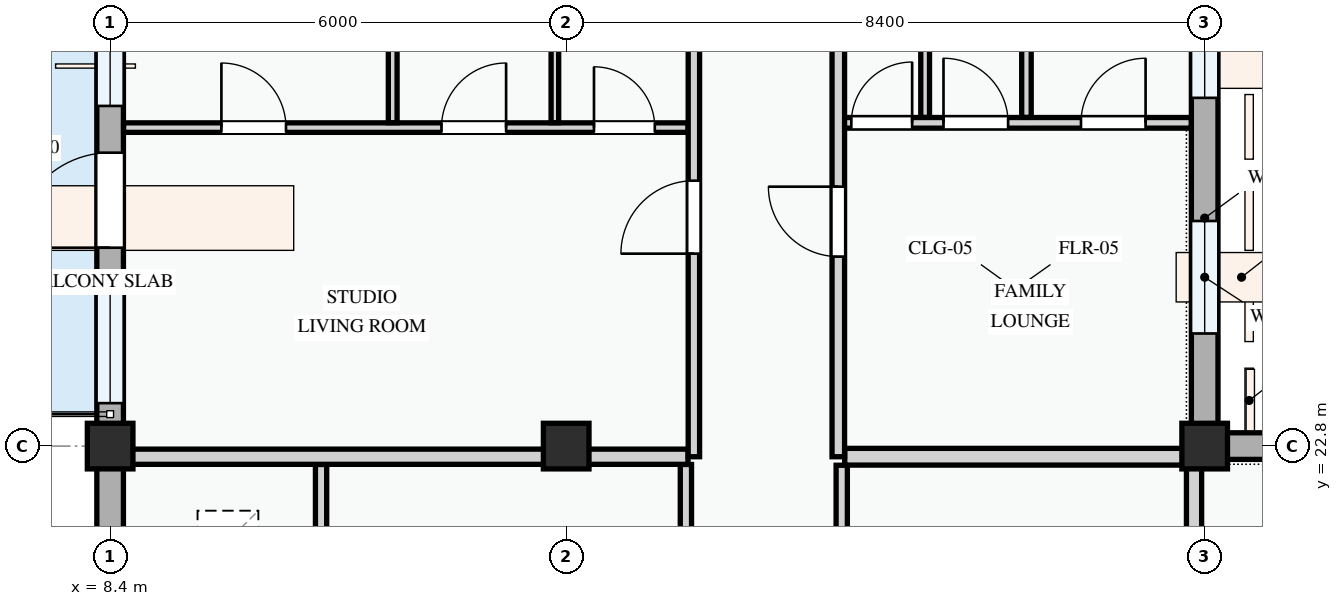
"""IFC4 building model, lengths in metres.
Left out: names, types, materials, properties, quantities, classifications, styles, units other than length and angle.
Written with IfcOpenShell. Run it as: python <this file> out.ifc"""

import sys

from ifc_helpers import new_model, si_unit, direction, frame, frame_2d, origin, origin_2d, place, context, subcontext, project, spatial, rectangle, extrude, element, fill, save


model = new_model("IFC4")
c1 = context("Model", 3, precision=1e-05, world=origin(), true_north=direction((0.0, 1.0)))
c2 = subcontext(c1, "Body", "Model", "MODEL_VIEW")
j1 = project(units=[si_unit("LENGTHUNIT", "METRE"), si_unit("PLANEANGLEUNIT", "RADIAN")], contexts=[c1])
p1 = place(None, origin())
s1 = spatial("IfcSite", under=j1, at=p1, CompositionType="ELEMENT")
p2 = place(p1, origin())
s2 = spatial("IfcBuilding", under=s1, at=p2, CompositionType="ELEMENT")
p3 = place(p2, frame((0.0, 0.0, 8.1)))
s3 = spatial("IfcBuildingStorey", under=s2, at=p3, CompositionType="ELEMENT", Elevation=8.1)
for number, where, z_axis, x_axis in (
    (1, (8.4, 22.8, 0.0), (0.0, 0.0, 1.0), (1.0, 0.0, 0.0)),
    (2, (14.4, 22.8, 0.0), (0.0, 0.0, 1.0), (1.0, 0.0, 0.0)),
    (3, (22.8, 22.8, 0.0), (0.0, 0.0, 1.0), (1.0, 0.0, 0.0)),
):
    element("IfcColumn", number, at=place(p3, frame(where, z_axis=z_axis, x_axis=x_axis)), inside=s3, PredefinedType="COLUMN", context=c2, shape_type="SweptSolid", body=[
        extrude(rectangle(XDim=0.6, YDim=0.6, at=origin_2d()), origin(), (0.0, 0.0, 1.0), 3.3),
    ])
p4 = place(p3, frame((22.8, 22.8, 0.0), z_axis=(0.0, 0.0, 1.0), x_axis=(0.0, 1.0, 0.0)))
e4 = element("IfcWall", 4, at=p4, inside=s3, PredefinedType="STANDARD", context=c2, shape_type="SweptSolid", body=[
    extrude(rectangle(XDim=6.0, YDim=0.35, at=frame_2d((3.0, 0.0))), origin(), (0.0, 0.0, 1.0), 2.575),
])
p5 = place(p4, frame((1.481, 0.0, 0.78)))
e5 = element("IfcOpeningElement", 5, at=p5, cuts=e4, PredefinedType="OPENING", context=c2, shape_type="SweptSolid", body=[
    extrude(rectangle(XDim=1.48, YDim=1.52, at=frame_2d((0.74, 0.76))), frame((0.0, 0.185, 0.0), z_axis=(0.0, -1.0, 0.0), x_axis=(1.0, 0.0, 0.0)), (0.0, 0.0, 1.0), 0.37),
])
p6 = place(p4, frame((4.581, 0.0, 0.78)))
e6 = element("IfcOpeningElement", 6, at=p6, cuts=e4, PredefinedType="OPENING", context=c2, shape_type="SweptSolid", body=[
    extrude(rectangle(XDim=0.9, YDim=1.2, at=frame_2d((0.45, 0.6))), frame((0.0, 0.185, 0.0), z_axis=(0.0, -1.0, 0.0), x_axis=(1.0, 0.0, 0.0)), (0.0, 0.0, 1.0), 0.37),
])
p7 = place(p3, frame((8.4, 28.8, 0.0), z_axis=(0.0, 0.0, 1.0), x_axis=(0.0, -1.0, 0.0)))
e7 = element("IfcWall", 7, at=p7, inside=s3, PredefinedType="STANDARD", context=c2, shape_type="SweptSolid", body=[
    extrude(rectangle(XDim=6.0, YDim=0.35, at=frame_2d((3.0, 0.0))), origin(), (0.0, 0.0, 1.0), 2.445),
])
p8 = place(p7, frame((2.14, 0.0, 0.0)))
e8 = element("IfcOpeningElement", 8, at=p8, cuts=e7, PredefinedType="OPENING", context=c2, shape_type="SweptSolid", body=[
    extrude(rectangle(XDim=1.25, YDim=2.2, at=frame_2d((0.625, 1.1))), frame((0.0, 0.185, 0.0), z_axis=(0.0, -1.0, 0.0), x_axis=(1.0, 0.0, 0.0)), (0.0, 0.0, 1.0), 0.37),
])
p9 = place(p7, frame((0.475, 0.0, 0.78)))
e9 = element("IfcOpeningElement", 9, at=p9, cuts=e7, PredefinedType="OPENING", context=c2, shape_type="SweptSolid", body=[
    extrude(rectangle(XDim=1.05, YDim=1.2, at=frame_2d((0.525, 0.6))), frame((0.0, 0.185, 0.0), z_axis=(0.0, -1.0, 0.0), x_axis=(1.0, 0.0, 0.0)), (0.0, 0.0, 1.0), 0.37),
])
p10 = place(p7, frame((3.815, 0.0, 0.78)))
e10 = element("IfcOpeningElement", 10, at=p10, cuts=e7, PredefinedType="OPENING", context=c2, shape_type="SweptSolid", body=[
    extrude(rectangle(XDim=1.62, YDim=1.38, at=frame_2d((0.81, 0.69))), frame((0.0, 0.185, 0.0), z_axis=(0.0, -1.0, 0.0), x_axis=(1.0, 0.0, 0.0)), (0.0, 0.0, 1.0), 0.37),
])
p11 = place(p3, frame((8.4, 22.8, 0.0), z_axis=(0.0, 0.0, 1.0), x_axis=(0.0, -1.0, 0.0)))
e11 = element("IfcWall", 11, at=p11, inside=s3, PredefinedType="STANDARD", context=c2, shape_type="SweptSolid", body=[
    extrude(rectangle(XDim=8.4, YDim=0.35, at=frame_2d((4.2, 0.0))), origin(), (0.0, 0.0, 1.0), 2.345),
])
p12 = place(p11, frame((1.485, 0.0, 0.78)))
e12 = element("IfcOpeningElement", 12, at=p12, cuts=e11, PredefinedType="OPENING", context=c2, shape_type="SweptSolid", body=[
    extrude(rectangle(XDim=1.42, YDim=1.38, at=frame_2d((0.71, 0.69))), frame((0.0, 0.185, 0.0), z_axis=(0.0, -1.0, 0.0), x_axis=(1.0, 0.0, 0.0)), (0.0, 0.0, 1.0), 0.37),
])
p13 = place(p11, frame((4.887, 0.0, 0.78)))
e13 = element("IfcOpeningElement", 13, at=p13, cuts=e11, PredefinedType="OPENING", context=c2, shape_type="SweptSolid", body=[
    extrude(rectangle(XDim=1.55, YDim=1.4, at=frame_2d((0.775, 0.7))), frame((0.0, 0.185, 0.0), z_axis=(0.0, -1.0, 0.0), x_axis=(1.0, 0.0, 0.0)), (0.0, 0.0, 1.0), 0.37),
])
p14 = place(p3, frame((28.8, 22.8, 0.0), z_axis=(0.0, 0.0, 1.0), x_axis=(-1.0, 0.0, 0.0)))
e14 = element("IfcWall", 14, at=p14, inside=s3, PredefinedType="STANDARD", context=c2, shape_type="SweptSolid", body=[
    extrude(rectangle(XDim=6.0, YDim=0.35, at=frame_2d((3.0, 0.0))), origin(), (0.0, 0.0, 1.0), 2.475),
])
p15 = place(p14, frame((0.519, 0.0, 0.78)))
e15 = element("IfcOpeningElement", 15, at=p15, cuts=e14, PredefinedType="OPENING", context=c2, shape_type="SweptSolid", body=[
    extrude(rectangle(XDim=0.9, YDim=1.2, at=frame_2d((0.45, 0.6))), frame((0.0, 0.185, 0.0), z_axis=(0.0, -1.0, 0.0), x_axis=(1.0, 0.0, 0.0)), (0.0, 0.0, 1.0), 0.37),
])
p16 = place(p14, frame((3.004, 0.0, 0.78)))
e16 = element("IfcOpeningElement", 16, at=p16, cuts=e14, PredefinedType="OPENING", context=c2, shape_type="SweptSolid", body=[
    extrude(rectangle(XDim=1.55, YDim=1.4, at=frame_2d((0.775, 0.7))), frame((0.0, 0.185, 0.0), z_axis=(0.0, -1.0, 0.0), x_axis=(1.0, 0.0, 0.0)), (0.0, 0.0, 1.0), 0.37),
])
for number, where, z_axis, x_axis in (
    (17, (11.175, 18.676, 0.0), (0.0, 0.0, 1.0), (0.0, 1.0, 0.0)),
    (18, (15.975, 18.676, 0.0), (0.0, 0.0, 1.0), (0.0, 1.0, 0.0)),
):
    element("IfcWall", number, at=place(p3, frame(where, z_axis=z_axis, x_axis=x_axis)), inside=s3, PredefinedType="PARTITIONING", context=c2, shape_type="SweptSolid", body=[
        extrude(rectangle(XDim=3.882, YDim=0.148, at=frame_2d((1.941, 0.0))), origin(), (0.0, 0.0, 1.0), 3.0),
    ])
p17 = place(p3, frame((18.025, 18.676, 0.0), z_axis=(0.0, 0.0, 1.0), x_axis=(0.0, 1.0, 0.0)))
e19 = element("IfcWall", 19, at=p17, inside=s3, PredefinedType="PARTITIONING", context=c2, shape_type="SweptSolid", body=[
    extrude(rectangle(XDim=3.872, YDim=0.148, at=frame_2d((1.936, 0.0))), origin(), (0.0, 0.0, 1.0), 3.0),
])
p18 = place(p3, frame((8.577, 26.99, 0.0), z_axis=(0.0, 0.0, 1.0), x_axis=(1.0, 0.0, 0.0)))
e20 = element("IfcWall", 20, at=p18, inside=s3, PredefinedType="PARTITIONING", context=c2, shape_type="SweptSolid", body=[
    extrude(rectangle(XDim=7.426, YDim=0.125, at=frame_2d((3.713, 0.0))), origin(), (0.0, 0.0, 1.0), 3.0),
])
p19 = place(p18, frame((1.287, 0.0, 0.0)))
e21 = element("IfcOpeningElement", 21, at=p19, cuts=e20, PredefinedType="OPENING", context=c2, shape_type="SweptSolid", body=[
    extrude(rectangle(XDim=0.85, YDim=2.1, at=frame_2d((0.425, 1.05))), frame((0.0, 0.073, 0.0), z_axis=(0.0, -1.0, 0.0), x_axis=(1.0, 0.0, 0.0)), (0.0, 0.0, 1.0), 0.145),
])
p20 = place(p18, frame((4.182, 0.0, 0.0)))
e22 = element("IfcOpeningElement", 22, at=p20, cuts=e20, PredefinedType="OPENING", context=c2, shape_type="SweptSolid", body=[
    extrude(rectangle(XDim=0.85, YDim=2.1, at=frame_2d((0.425, 1.05))), frame((0.0, 0.073, 0.0), z_axis=(0.0, -1.0, 0.0), x_axis=(1.0, 0.0, 0.0)), (0.0, 0.0, 1.0), 0.145),
])
p21 = place(p18, frame((6.189, 0.0, 0.0)))
e23 = element("IfcOpeningElement", 23, at=p21, cuts=e20, PredefinedType="OPENING", context=c2, shape_type="SweptSolid", body=[
    extrude(rectangle(XDim=0.8, YDim=2.1, at=frame_2d((0.4, 1.05))), frame((0.0, 0.073, 0.0), z_axis=(0.0, -1.0, 0.0), x_axis=(1.0, 0.0, 0.0)), (0.0, 0.0, 1.0), 0.145),
])
p22 = place(p3, frame((12.118, 27.054, 0.0), z_axis=(0.0, 0.0, 1.0), x_axis=(0.0, 1.0, 0.0)))
e24 = element("IfcWall", 24, at=p22, inside=s3, PredefinedType="PARTITIONING", context=c2, shape_type="SweptSolid", body=[
    extrude(rectangle(XDim=7.371, YDim=0.115, at=frame_2d((3.686, 0.0))), origin(), (0.0, 0.0, 1.0), 3.0),
])
p23 = place(p3, frame((14.251, 27.054, 0.0), z_axis=(0.0, 0.0, 1.0), x_axis=(0.0, 1.0, 0.0)))
e25 = element("IfcWall", 25, at=p23, inside=s3, PredefinedType="PARTITIONING", context=c2, shape_type="SweptSolid", body=[
    extrude(rectangle(XDim=7.371, YDim=0.1, at=frame_2d((3.686, 0.0))), origin(), (0.0, 0.0, 1.0), 2.425),
])
p24 = place(p3, frame((17.98, 27.053, 0.0), z_axis=(0.0, 0.0, 1.0), x_axis=(1.0, 0.0, 0.0)))
e26 = element("IfcWall", 26, at=p24, inside=s3, PredefinedType="PARTITIONING", context=c2, shape_type="SweptSolid", body=[
    extrude(rectangle(XDim=4.643, YDim=0.14, at=frame_2d((2.322, 0.0))), origin(), (0.0, 0.0, 1.0), 3.0),
])
p25 = place(p24, frame((0.171, 0.0, 0.0)))
e27 = element("IfcOpeningElement", 27, at=p25, cuts=e26, PredefinedType="OPENING", context=c2, shape_type="SweptSolid", body=[
    extrude(rectangle(XDim=0.8, YDim=2.1, at=frame_2d((0.4, 1.05))), frame((0.0, 0.08, 0.0), z_axis=(0.0, -1.0, 0.0), x_axis=(1.0, 0.0, 0.0)), (0.0, 0.0, 1.0), 0.16),
])
p26 = place(p24, frame((1.384, 0.0, 0.0)))
e28 = element("IfcOpeningElement", 28, at=p26, cuts=e26, PredefinedType="OPENING", context=c2, shape_type="SweptSolid", body=[
    extrude(rectangle(XDim=0.85, YDim=2.1, at=frame_2d((0.425, 1.05))), frame((0.0, 0.08, 0.0), z_axis=(0.0, -1.0, 0.0), x_axis=(1.0, 0.0, 0.0)), (0.0, 0.0, 1.0), 0.16),
])
p27 = place(p24, frame((3.193, 0.0, 0.0)))
e29 = element("IfcOpeningElement", 29, at=p27, cuts=e26, PredefinedType="OPENING", context=c2, shape_type="SweptSolid", body=[
    extrude(rectangle(XDim=0.85, YDim=2.1, at=frame_2d((0.425, 1.05))), frame((0.0, 0.08, 0.0), z_axis=(0.0, -1.0, 0.0), x_axis=(1.0, 0.0, 0.0)), (0.0, 0.0, 1.0), 0.16),
])
p28 = place(p3, frame((20.455, 27.125, 0.0), z_axis=(0.0, 0.0, 1.0), x_axis=(0.0, 1.0, 0.0)))
e30 = element("IfcWall", 30, at=p28, inside=s3, PredefinedType="PARTITIONING", context=c2, shape_type="SweptSolid", body=[
    extrude(rectangle(XDim=7.293, YDim=0.125, at=frame_2d((3.646, 0.0))), origin(), (0.0, 0.0, 1.0), 3.0),
])
p29 = place(p3, frame((19.122, 27.125, 0.0), z_axis=(0.0, 0.0, 1.0), x_axis=(0.0, 1.0, 0.0)))
e31 = element("IfcWall", 31, at=p29, inside=s3, PredefinedType="PARTITIONING", context=c2, shape_type="SweptSolid", body=[
    extrude(rectangle(XDim=7.293, YDim=0.115, at=frame_2d((3.646, 0.0))), origin(), (0.0, 0.0, 1.0), 3.0),
])
p30 = place(p3, frame((8.577, 22.66, 0.0), z_axis=(0.0, 0.0, 1.0), x_axis=(1.0, 0.0, 0.0)))
e32 = element("IfcWall", 32, at=p30, inside=s3, PredefinedType="PARTITIONING", context=c2, shape_type="SweptSolid", body=[
    extrude(rectangle(XDim=7.426, YDim=0.2, at=frame_2d((3.713, 0.0))), origin(), (0.0, 0.0, 1.0), 2.375),
])
p31 = place(p3, frame((18.064, 22.66, 0.0), z_axis=(0.0, 0.0, 1.0), x_axis=(1.0, 0.0, 0.0)))
e33 = element("IfcWall", 33, at=p31, inside=s3, PredefinedType="PARTITIONING", context=c2, shape_type="SweptSolid", body=[
    extrude(rectangle(XDim=4.494, YDim=0.22, at=frame_2d((2.247, 0.0))), origin(), (0.0, 0.0, 1.0), 2.375),
])
p32 = place(p3, frame((16.08, 22.66, 0.0), z_axis=(0.0, 0.0, 1.0), x_axis=(0.0, 1.0, 0.0)))
e34 = element("IfcWall", 34, at=p32, inside=s3, PredefinedType="PARTITIONING", context=c2, shape_type="SweptSolid", body=[
    extrude(rectangle(XDim=34.763, YDim=0.15, at=frame_2d((17.382, 0.0))), origin(), (0.0, 0.0, 1.0), 3.0),
])
p33 = place(p32, frame((2.672, 0.0, 0.0)))
e35 = element("IfcOpeningElement", 35, at=p33, cuts=e34, PredefinedType="OPENING", context=c2, shape_type="SweptSolid", body=[
    extrude(rectangle(XDim=0.96, YDim=2.12, at=frame_2d((0.48, 1.06))), frame((0.0, 0.085, 0.0), z_axis=(0.0, -1.0, 0.0), x_axis=(1.0, 0.0, 0.0)), (0.0, 0.0, 1.0), 0.17),
])
p34 = place(p32, frame((16.58, 0.0, 0.0)))
e36 = element("IfcOpeningElement", 36, at=p34, cuts=e34, PredefinedType="OPENING", context=c2, shape_type="SweptSolid", body=[
    extrude(rectangle(XDim=0.92, YDim=2.1, at=frame_2d((0.46, 1.05))), frame((0.0, 0.085, 0.0), z_axis=(0.0, -1.0, 0.0), x_axis=(1.0, 0.0, 0.0)), (0.0, 0.0, 1.0), 0.17),
])
p35 = place(p32, frame((24.315, 0.0, 0.0)))
e37 = element("IfcOpeningElement", 37, at=p35, cuts=e34, PredefinedType="OPENING", context=c2, shape_type="SweptSolid", body=[
    extrude(rectangle(XDim=0.92, YDim=2.1, at=frame_2d((0.46, 1.05))), frame((0.0, 0.085, 0.0), z_axis=(0.0, -1.0, 0.0), x_axis=(1.0, 0.0, 0.0)), (0.0, 0.0, 1.0), 0.17),
])
p36 = place(p3, frame((17.98, 22.66, 0.0), z_axis=(0.0, 0.0, 1.0), x_axis=(0.0, 1.0, 0.0)))
e38 = element("IfcWall", 38, at=p36, inside=s3, PredefinedType="PARTITIONING", context=c2, shape_type="SweptSolid", body=[
    extrude(rectangle(XDim=34.763, YDim=0.165, at=frame_2d((17.382, 0.0))), origin(), (0.0, 0.0, 1.0), 3.0),
])
p37 = place(p36, frame((2.633, 0.0, 0.0)))
e39 = element("IfcOpeningElement", 39, at=p37, cuts=e38, PredefinedType="OPENING", context=c2, shape_type="SweptSolid", body=[
    extrude(rectangle(XDim=0.92, YDim=2.1, at=frame_2d((0.46, 1.05))), frame((0.0, 0.093, 0.0), z_axis=(0.0, -1.0, 0.0), x_axis=(1.0, 0.0, 0.0)), (0.0, 0.0, 1.0), 0.185),
])
p38 = place(p36, frame((16.343, 0.0, 0.0)))
e40 = element("IfcOpeningElement", 40, at=p38, cuts=e38, PredefinedType="OPENING", context=c2, shape_type="SweptSolid", body=[
    extrude(rectangle(XDim=0.92, YDim=2.1, at=frame_2d((0.46, 1.05))), frame((0.0, 0.093, 0.0), z_axis=(0.0, -1.0, 0.0), x_axis=(1.0, 0.0, 0.0)), (0.0, 0.0, 1.0), 0.185),
])
p39 = place(p36, frame((24.313, 0.0, 0.0)))
e41 = element("IfcOpeningElement", 41, at=p39, cuts=e38, PredefinedType="OPENING", context=c2, shape_type="SweptSolid", body=[
    extrude(rectangle(XDim=0.96, YDim=2.12, at=frame_2d((0.48, 1.06))), frame((0.0, 0.093, 0.0), z_axis=(0.0, -1.0, 0.0), x_axis=(1.0, 0.0, 0.0)), (0.0, 0.0, 1.0), 0.185),
])
p40 = place(p3, frame((22.66, 18.064, 0.0), z_axis=(0.0, 0.0, 1.0), x_axis=(0.0, 1.0, 0.0)))
e42 = element("IfcWall", 42, at=p40, inside=s3, PredefinedType="PARTITIONING", context=c2, shape_type="SweptSolid", body=[
    extrude(rectangle(XDim=4.676, YDim=0.2, at=frame_2d((2.338, 0.0))), origin(), (0.0, 0.0, 1.0), 2.425),
])
p41 = place(p5, origin())
e43 = element("IfcWindow", 43, at=p41, inside=s3, PartitioningType="SINGLE_PANEL", PredefinedType="WINDOW", context=c2, shape_type="SweptSolid", body=[
    extrude(rectangle(XDim=1.48, YDim=1.52, at=frame_2d((0.74, 0.76))), frame((0.0, 0.03, 0.0), z_axis=(0.0, -1.0, 0.0), x_axis=(1.0, 0.0, 0.0)), (0.0, 0.0, 1.0), 0.06),
])
fill(e5, e43)
p42 = place(p6, origin())
e44 = element("IfcWindow", 44, at=p42, inside=s3, PartitioningType="SINGLE_PANEL", PredefinedType="WINDOW", context=c2, shape_type="SweptSolid", body=[
    extrude(rectangle(XDim=0.9, YDim=1.2, at=frame_2d((0.45, 0.6))), frame((0.0, 0.03, 0.0), z_axis=(0.0, -1.0, 0.0), x_axis=(1.0, 0.0, 0.0)), (0.0, 0.0, 1.0), 0.06),
])
fill(e6, e44)
p43 = place(p8, frame((1.25, 0.0, 0.0), z_axis=(0.0, 0.0, 1.0), x_axis=(-1.0, 0.0, 0.0)))
e45 = element("IfcDoor", 45, at=p43, inside=s3, OperationType="SINGLE_SWING_LEFT", PredefinedType="DOOR", context=c2, shape_type="SweptSolid", body=[
    extrude(rectangle(XDim=1.25, YDim=2.2, at=frame_2d((0.625, 1.1))), frame((0.0, 0.025, 0.0), z_axis=(0.0, -1.0, 0.0), x_axis=(1.0, 0.0, 0.0)), (0.0, 0.0, 1.0), 0.05),
])
fill(e8, e45)
p44 = place(p9, origin())
e46 = element("IfcWindow", 46, at=p44, inside=s3, PartitioningType="SINGLE_PANEL", PredefinedType="WINDOW", context=c2, shape_type="SweptSolid", body=[
    extrude(rectangle(XDim=1.05, YDim=1.2, at=frame_2d((0.525, 0.6))), frame((0.0, 0.03, 0.0), z_axis=(0.0, -1.0, 0.0), x_axis=(1.0, 0.0, 0.0)), (0.0, 0.0, 1.0), 0.06),
])
fill(e9, e46)
p45 = place(p10, origin())
e47 = element("IfcWindow", 47, at=p45, inside=s3, PartitioningType="DOUBLE_PANEL_VERTICAL", PredefinedType="WINDOW", context=c2, shape_type="SweptSolid", body=[
    extrude(rectangle(XDim=1.62, YDim=1.38, at=frame_2d((0.81, 0.69))), frame((0.0, 0.03, 0.0), z_axis=(0.0, -1.0, 0.0), x_axis=(1.0, 0.0, 0.0)), (0.0, 0.0, 1.0), 0.06),
])
fill(e10, e47)
p46 = place(p19, origin())
e48 = element("IfcDoor", 48, at=p46, inside=s3, OperationType="SINGLE_SWING_LEFT", PredefinedType="DOOR", context=c2, shape_type="SweptSolid", body=[
    extrude(rectangle(XDim=0.85, YDim=2.1, at=frame_2d((0.425, 1.05))), frame((0.0, 0.025, 0.0), z_axis=(0.0, -1.0, 0.0), x_axis=(1.0, 0.0, 0.0)), (0.0, 0.0, 1.0), 0.05),
])
fill(e21, e48)
p47 = place(p20, origin())
e49 = element("IfcDoor", 49, at=p47, inside=s3, OperationType="SINGLE_SWING_RIGHT", PredefinedType="DOOR", context=c2, shape_type="SweptSolid", body=[
    extrude(rectangle(XDim=0.85, YDim=2.1, at=frame_2d((0.425, 1.05))), frame((0.0, 0.025, 0.0), z_axis=(0.0, -1.0, 0.0), x_axis=(1.0, 0.0, 0.0)), (0.0, 0.0, 1.0), 0.05),
])
fill(e22, e49)
p48 = place(p21, origin())
e50 = element("IfcDoor", 50, at=p48, inside=s3, OperationType="SINGLE_SWING_LEFT", PredefinedType="DOOR", context=c2, shape_type="SweptSolid", body=[
    extrude(rectangle(XDim=0.8, YDim=2.1, at=frame_2d((0.4, 1.05))), frame((0.0, 0.025, 0.0), z_axis=(0.0, -1.0, 0.0), x_axis=(1.0, 0.0, 0.0)), (0.0, 0.0, 1.0), 0.05),
])
fill(e23, e50)
p49 = place(p25, origin())
e51 = element("IfcDoor", 51, at=p49, inside=s3, OperationType="SINGLE_SWING_RIGHT", PredefinedType="DOOR", context=c2, shape_type="SweptSolid", body=[
    extrude(rectangle(XDim=0.8, YDim=2.1, at=frame_2d((0.4, 1.05))), frame((0.0, 0.025, 0.0), z_axis=(0.0, -1.0, 0.0), x_axis=(1.0, 0.0, 0.0)), (0.0, 0.0, 1.0), 0.05),
])
fill(e27, e51)
p50 = place(p26, origin())
e52 = element("IfcDoor", 52, at=p50, inside=s3, OperationType="SINGLE_SWING_LEFT", PredefinedType="DOOR", context=c2, shape_type="SweptSolid", body=[
    extrude(rectangle(XDim=0.85, YDim=2.1, at=frame_2d((0.425, 1.05))), frame((0.0, 0.025, 0.0), z_axis=(0.0, -1.0, 0.0), x_axis=(1.0, 0.0, 0.0)), (0.0, 0.0, 1.0), 0.05),
])
fill(e28, e52)
p51 = place(p27, origin())
e53 = element("IfcDoor", 53, at=p51, inside=s3, OperationType="SINGLE_SWING_RIGHT", PredefinedType="DOOR", context=c2, shape_type="SweptSolid", body=[
    extrude(rectangle(XDim=0.85, YDim=2.1, at=frame_2d((0.425, 1.05))), frame((0.0, 0.025, 0.0), z_axis=(0.0, -1.0, 0.0), x_axis=(1.0, 0.0, 0.0)), (0.0, 0.0, 1.0), 0.05),
])
fill(e29, e53)
p52 = place(p33, origin())
e54 = element("IfcDoor", 54, at=p52, inside=s3, OperationType="SINGLE_SWING_LEFT", PredefinedType="DOOR", context=c2, shape_type="SweptSolid", body=[
    extrude(rectangle(XDim=0.96, YDim=2.12, at=frame_2d((0.48, 1.06))), frame((0.0, 0.025, 0.0), z_axis=(0.0, -1.0, 0.0), x_axis=(1.0, 0.0, 0.0)), (0.0, 0.0, 1.0), 0.05),
])
fill(e35, e54)
p53 = place(p37, origin())
e55 = element("IfcDoor", 55, at=p53, inside=s3, OperationType="SINGLE_SWING_RIGHT", PredefinedType="DOOR", context=c2, shape_type="SweptSolid", body=[
    extrude(rectangle(XDim=0.92, YDim=2.1, at=frame_2d((0.46, 1.05))), frame((0.0, 0.025, 0.0), z_axis=(0.0, -1.0, 0.0), x_axis=(1.0, 0.0, 0.0)), (0.0, 0.0, 1.0), 0.05),
])
fill(e39, e55)
save(model, sys.argv[1])
